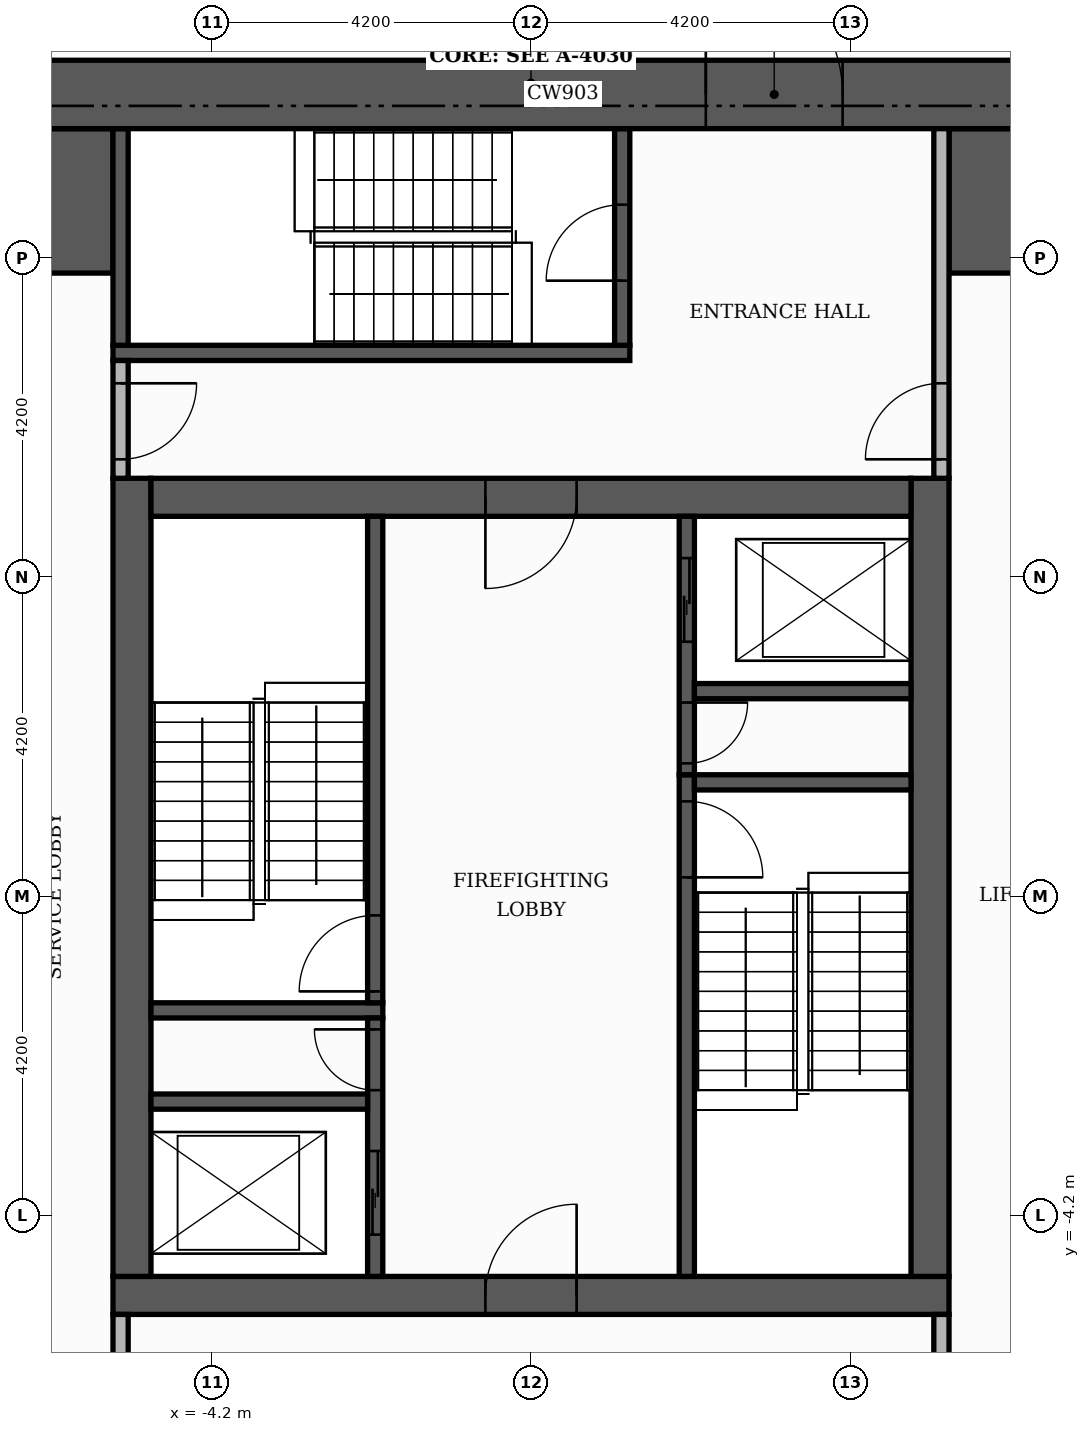
"""IFC4 building model, lengths in metres.
Left out: names, types, materials, properties, quantities, classifications, styles, units other than length and angle.
Written with IfcOpenShell. Run it as: python <this file> out.ifc"""

import sys

from ifc_helpers import new_model, si_unit, direction, frame, frame_2d, origin, place, context, subcontext, project, spatial, rectangle, extrude, element, fill, save


model = new_model("IFC4")
c1 = context("Model", 3, precision=1e-05, world=origin(), true_north=direction((0.0, 1.0)))
c2 = subcontext(c1, "Body", "Model", "MODEL_VIEW")
j1 = project(units=[si_unit("LENGTHUNIT", "METRE"), si_unit("PLANEANGLEUNIT", "RADIAN")], contexts=[c1])
p1 = place(None, origin())
s1 = spatial("IfcSite", under=j1, at=p1, CompositionType="ELEMENT")
p2 = place(p1, origin())
s2 = spatial("IfcBuilding", under=s1, at=p2, CompositionType="ELEMENT")
p3 = place(p2, frame((0.0, 0.0, 180.6)))
s3 = spatial("IfcBuildingStorey", under=s2, at=p3, CompositionType="ELEMENT", Elevation=180.6)
p4 = place(p3, frame((-5.5, -5.25, 0.0), z_axis=(0.0, 0.0, 1.0), x_axis=(1.0, 0.0, 0.0)))
e1 = element("IfcWall", 1, at=p4, inside=s3, PredefinedType="SHEAR", context=c2, shape_type="SweptSolid", body=[
    extrude(rectangle(XDim=11.0, YDim=0.5, at=frame_2d((5.5, 0.0))), origin(), (0.0, 0.0, 1.0), 7.38),
])
p5 = place(p4, frame((4.9, 0.0, 0.0)))
e2 = element("IfcOpeningElement", 2, at=p5, cuts=e1, PredefinedType="OPENING", context=c2, shape_type="SweptSolid", body=[
    extrude(rectangle(XDim=1.2, YDim=2.1, at=frame_2d((0.6, 1.05))), frame((0.0, 0.26, 0.0), z_axis=(0.0, -1.0, 0.0), x_axis=(1.0, 0.0, 0.0)), (0.0, 0.0, 1.0), 0.52),
])
for number, where, z_axis, x_axis in (
    (3, (-5.25, -5.0, 0.0), (0.0, 0.0, 1.0), (0.0, 1.0, 0.0)),
    (4, (5.25, -5.0, 0.0), (0.0, 0.0, 1.0), (0.0, 1.0, 0.0)),
):
    element("IfcWall", number, at=place(p3, frame(where, z_axis=z_axis, x_axis=x_axis)), inside=s3, PredefinedType="SHEAR", context=c2, shape_type="SweptSolid", body=[
        extrude(rectangle(XDim=10.5, YDim=0.5, at=frame_2d((5.25, 0.0))), origin(), (0.0, 0.0, 1.0), 7.38),
    ])
p6 = place(p3, frame((-5.0, 5.25, 0.0), z_axis=(0.0, 0.0, 1.0), x_axis=(1.0, 0.0, 0.0)))
e5 = element("IfcWall", 5, at=p6, inside=s3, PredefinedType="SHEAR", context=c2, shape_type="SweptSolid", body=[
    extrude(rectangle(XDim=10.0, YDim=0.5, at=frame_2d((5.0, 0.0))), origin(), (0.0, 0.0, 1.0), 7.38),
])
p7 = place(p6, frame((4.4, 0.0, 0.0)))
e6 = element("IfcOpeningElement", 6, at=p7, cuts=e5, PredefinedType="OPENING", context=c2, shape_type="SweptSolid", body=[
    extrude(rectangle(XDim=1.2, YDim=2.1, at=frame_2d((0.6, 1.05))), frame((0.0, 0.26, 0.0), z_axis=(0.0, -1.0, 0.0), x_axis=(1.0, 0.0, 0.0)), (0.0, 0.0, 1.0), 0.52),
])
for number, where, z_axis, x_axis in (
    (7, (-10.1, 9.15, 0.0), (0.0, 0.0, 1.0), (1.0, 0.0, 0.0)),
    (8, (5.5, 9.15, 0.0), (0.0, 0.0, 1.0), (1.0, 0.0, 0.0)),
):
    element("IfcWall", number, at=place(p3, frame(where, z_axis=z_axis, x_axis=x_axis)), inside=s3, PredefinedType="SHEAR", context=c2, shape_type="SweptSolid", body=[
        extrude(rectangle(XDim=4.6, YDim=1.9, at=frame_2d((2.3, 0.0))), origin(), (0.0, 0.0, 1.0), 7.38),
    ])
p8 = place(p3, frame((2.05, -5.0, 0.0), z_axis=(0.0, 0.0, 1.0), x_axis=(0.0, 1.0, 0.0)))
e9 = element("IfcWall", 9, at=p8, inside=s3, PredefinedType="SHEAR", context=c2, shape_type="SweptSolid", body=[
    extrude(rectangle(XDim=6.6, YDim=0.2, at=frame_2d((3.3, 0.0))), origin(), (0.0, 0.0, 1.0), 7.38),
])
p9 = place(p8, frame((5.25, 0.0, 0.0)))
e10 = element("IfcOpeningElement", 10, at=p9, cuts=e9, PredefinedType="OPENING", context=c2, shape_type="SweptSolid", body=[
    extrude(rectangle(XDim=1.0, YDim=2.1, at=frame_2d((0.5, 1.05))), frame((0.0, 0.11, 0.0), z_axis=(0.0, -1.0, 0.0), x_axis=(1.0, 0.0, 0.0)), (0.0, 0.0, 1.0), 0.22),
])
p10 = place(p3, frame((-5.0, -1.5, 0.0), z_axis=(0.0, 0.0, 1.0), x_axis=(1.0, 0.0, 0.0)))
e11 = element("IfcWall", 11, at=p10, inside=s3, PredefinedType="SHEAR", context=c2, shape_type="SweptSolid", body=[
    extrude(rectangle(XDim=3.05, YDim=0.2, at=frame_2d((1.525, 0.0))), origin(), (0.0, 0.0, 1.0), 7.38),
])
p11 = place(p3, frame((-2.05, -1.4, 0.0), z_axis=(0.0, 0.0, 1.0), x_axis=(0.0, 1.0, 0.0)))
e12 = element("IfcWall", 12, at=p11, inside=s3, PredefinedType="SHEAR", context=c2, shape_type="SweptSolid", body=[
    extrude(rectangle(XDim=6.4, YDim=0.2, at=frame_2d((3.2, 0.0))), origin(), (0.0, 0.0, 1.0), 7.38),
])
p12 = place(p11, frame((0.15, 0.0, 0.0)))
e13 = element("IfcOpeningElement", 13, at=p12, cuts=e12, PredefinedType="OPENING", context=c2, shape_type="SweptSolid", body=[
    extrude(rectangle(XDim=1.0, YDim=2.1, at=frame_2d((0.5, 1.05))), frame((0.0, 0.11, 0.0), z_axis=(0.0, -1.0, 0.0), x_axis=(1.0, 0.0, 0.0)), (0.0, 0.0, 1.0), 0.22),
])
p13 = place(p3, frame((2.15, 1.5, 0.0), z_axis=(0.0, 0.0, 1.0), x_axis=(1.0, 0.0, 0.0)))
e14 = element("IfcWall", 14, at=p13, inside=s3, PredefinedType="SHEAR", context=c2, shape_type="SweptSolid", body=[
    extrude(rectangle(XDim=2.85, YDim=0.2, at=frame_2d((1.425, 0.0))), origin(), (0.0, 0.0, 1.0), 7.38),
])
p14 = place(p3, frame((-5.5, 7.15, 0.0), z_axis=(0.0, 0.0, 1.0), x_axis=(1.0, 0.0, 0.0)))
e15 = element("IfcWall", 15, at=p14, inside=s3, PredefinedType="SHEAR", context=c2, shape_type="SweptSolid", body=[
    extrude(rectangle(XDim=6.8, YDim=0.2, at=frame_2d((3.4, 0.0))), origin(), (0.0, 0.0, 1.0), 7.38),
])
p15 = place(p3, frame((-5.4, 7.25, 0.0), z_axis=(0.0, 0.0, 1.0), x_axis=(0.0, 1.0, 0.0)))
e16 = element("IfcWall", 16, at=p15, inside=s3, PredefinedType="SHEAR", context=c2, shape_type="SweptSolid", body=[
    extrude(rectangle(XDim=2.85, YDim=0.2, at=frame_2d((1.425, 0.0))), origin(), (0.0, 0.0, 1.0), 7.38),
])
p16 = place(p3, frame((1.2, 7.25, 0.0), z_axis=(0.0, 0.0, 1.0), x_axis=(0.0, 1.0, 0.0)))
e17 = element("IfcWall", 17, at=p16, inside=s3, PredefinedType="SHEAR", context=c2, shape_type="SweptSolid", body=[
    extrude(rectangle(XDim=2.85, YDim=0.2, at=frame_2d((1.425, 0.0))), origin(), (0.0, 0.0, 1.0), 7.38),
])
p17 = place(p16, frame((0.85, 0.0, 0.0)))
e18 = element("IfcOpeningElement", 18, at=p17, cuts=e17, PredefinedType="OPENING", context=c2, shape_type="SweptSolid", body=[
    extrude(rectangle(XDim=1.0, YDim=2.1, at=frame_2d((0.5, 1.05))), frame((0.0, 0.11, 0.0), z_axis=(0.0, -1.0, 0.0), x_axis=(1.0, 0.0, 0.0)), (0.0, 0.0, 1.0), 0.22),
])
p18 = place(p3, frame((-2.05, -5.0, 0.0), z_axis=(0.0, 0.0, 1.0), x_axis=(0.0, 1.0, 0.0)))
e19 = element("IfcWall", 19, at=p18, inside=s3, PredefinedType="SHEAR", context=c2, shape_type="SweptSolid", body=[
    extrude(rectangle(XDim=3.4, YDim=0.2, at=frame_2d((1.7, 0.0))), origin(), (0.0, 0.0, 1.0), 7.38),
])
p19 = place(p18, frame((0.55, 0.0, 0.0)))
e20 = element("IfcOpeningElement", 20, at=p19, cuts=e19, PredefinedType="OPENING", context=c2, shape_type="SweptSolid", body=[
    extrude(rectangle(XDim=1.1, YDim=2.1, at=frame_2d((0.55, 1.05))), frame((0.0, 0.11, 0.0), z_axis=(0.0, -1.0, 0.0), x_axis=(1.0, 0.0, 0.0)), (0.0, 0.0, 1.0), 0.22),
])
p20 = place(p18, frame((2.45, 0.0, 0.0)))
e21 = element("IfcOpeningElement", 21, at=p20, cuts=e19, PredefinedType="OPENING", context=c2, shape_type="SweptSolid", body=[
    extrude(rectangle(XDim=0.8, YDim=2.1, at=frame_2d((0.4, 1.05))), frame((0.0, 0.11, 0.0), z_axis=(0.0, -1.0, 0.0), x_axis=(1.0, 0.0, 0.0)), (0.0, 0.0, 1.0), 0.22),
])
p21 = place(p3, frame((-5.0, -2.7, 0.0), z_axis=(0.0, 0.0, 1.0), x_axis=(1.0, 0.0, 0.0)))
e22 = element("IfcWall", 22, at=p21, inside=s3, PredefinedType="SHEAR", context=c2, shape_type="SweptSolid", body=[
    extrude(rectangle(XDim=2.85, YDim=0.2, at=frame_2d((1.425, 0.0))), origin(), (0.0, 0.0, 1.0), 7.38),
])
p22 = place(p3, frame((2.05, 1.6, 0.0), z_axis=(0.0, 0.0, 1.0), x_axis=(0.0, 1.0, 0.0)))
e23 = element("IfcWall", 23, at=p22, inside=s3, PredefinedType="SHEAR", context=c2, shape_type="SweptSolid", body=[
    extrude(rectangle(XDim=3.4, YDim=0.2, at=frame_2d((1.7, 0.0))), origin(), (0.0, 0.0, 1.0), 7.38),
])
p23 = place(p22, frame((1.75, 0.0, 0.0)))
e24 = element("IfcOpeningElement", 24, at=p23, cuts=e23, PredefinedType="OPENING", context=c2, shape_type="SweptSolid", body=[
    extrude(rectangle(XDim=1.1, YDim=2.1, at=frame_2d((0.55, 1.05))), frame((0.0, 0.11, 0.0), z_axis=(0.0, -1.0, 0.0), x_axis=(1.0, 0.0, 0.0)), (0.0, 0.0, 1.0), 0.22),
])
p24 = place(p22, frame((0.15, 0.0, 0.0)))
e25 = element("IfcOpeningElement", 25, at=p24, cuts=e23, PredefinedType="OPENING", context=c2, shape_type="SweptSolid", body=[
    extrude(rectangle(XDim=0.8, YDim=2.1, at=frame_2d((0.4, 1.05))), frame((0.0, 0.11, 0.0), z_axis=(0.0, -1.0, 0.0), x_axis=(1.0, 0.0, 0.0)), (0.0, 0.0, 1.0), 0.22),
])
p25 = place(p3, frame((2.15, 2.7, 0.0), z_axis=(0.0, 0.0, 1.0), x_axis=(1.0, 0.0, 0.0)))
e26 = element("IfcWall", 26, at=p25, inside=s3, PredefinedType="SHEAR", context=c2, shape_type="SweptSolid", body=[
    extrude(rectangle(XDim=2.85, YDim=0.2, at=frame_2d((1.425, 0.0))), origin(), (0.0, 0.0, 1.0), 7.38),
])
p26 = place(p3, frame((-11.0, 10.55, 0.0), z_axis=(0.0, 0.0, 1.0), x_axis=(1.0, 0.0, 0.0)))
e27 = element("IfcWall", 27, at=p26, inside=s3, PredefinedType="SHEAR", context=c2, shape_type="SweptSolid", body=[
    extrude(rectangle(XDim=22.0, YDim=0.9, at=frame_2d((11.0, 0.0))), origin(), (0.0, 0.0, 1.0), 7.38),
])
p27 = place(p26, frame((13.3, 0.0, 0.0)))
e28 = element("IfcOpeningElement", 28, at=p27, cuts=e27, PredefinedType="OPENING", context=c2, shape_type="SweptSolid", body=[
    extrude(rectangle(XDim=1.8, YDim=2.2, at=frame_2d((0.9, 1.1))), frame((0.0, 0.46, 0.0), z_axis=(0.0, -1.0, 0.0), x_axis=(1.0, 0.0, 0.0)), (0.0, 0.0, 1.0), 0.92),
])
p28 = place(p3, frame((-5.4, -10.1, 0.0), z_axis=(0.0, 0.0, 1.0), x_axis=(0.0, 1.0, 0.0)))
e29 = element("IfcWall", 29, at=p28, inside=s3, PredefinedType="PARTITIONING", context=c2, shape_type="SweptSolid", body=[
    extrude(rectangle(XDim=4.6, YDim=0.2, at=frame_2d((2.3, 0.0))), origin(), (0.0, 0.0, 1.0), 7.38),
])
p29 = place(p28, frame((2.9, 0.0, 0.0)))
e30 = element("IfcOpeningElement", 30, at=p29, cuts=e29, PredefinedType="OPENING", context=c2, shape_type="SweptSolid", body=[
    extrude(rectangle(XDim=1.0, YDim=2.1, at=frame_2d((0.5, 1.05))), frame((0.0, 0.11, 0.0), z_axis=(0.0, -1.0, 0.0), x_axis=(1.0, 0.0, 0.0)), (0.0, 0.0, 1.0), 0.22),
])
p30 = place(p3, frame((5.4, -10.1, 0.0), z_axis=(0.0, 0.0, 1.0), x_axis=(0.0, 1.0, 0.0)))
e31 = element("IfcWall", 31, at=p30, inside=s3, PredefinedType="PARTITIONING", context=c2, shape_type="SweptSolid", body=[
    extrude(rectangle(XDim=4.6, YDim=0.2, at=frame_2d((2.3, 0.0))), origin(), (0.0, 0.0, 1.0), 7.38),
])
p31 = place(p30, frame((2.9, 0.0, 0.0)))
e32 = element("IfcOpeningElement", 32, at=p31, cuts=e31, PredefinedType="OPENING", context=c2, shape_type="SweptSolid", body=[
    extrude(rectangle(XDim=1.0, YDim=2.1, at=frame_2d((0.5, 1.05))), frame((0.0, 0.11, 0.0), z_axis=(0.0, -1.0, 0.0), x_axis=(1.0, 0.0, 0.0)), (0.0, 0.0, 1.0), 0.22),
])
p32 = place(p3, frame((-5.4, 5.5, 0.0), z_axis=(0.0, 0.0, 1.0), x_axis=(0.0, 1.0, 0.0)))
e33 = element("IfcWall", 33, at=p32, inside=s3, PredefinedType="PARTITIONING", context=c2, shape_type="SweptSolid", body=[
    extrude(rectangle(XDim=1.55, YDim=0.2, at=frame_2d((0.775, 0.0))), origin(), (0.0, 0.0, 1.0), 7.38),
])
p33 = place(p32, frame((0.25, 0.0, 0.0)))
e34 = element("IfcOpeningElement", 34, at=p33, cuts=e33, PredefinedType="OPENING", context=c2, shape_type="SweptSolid", body=[
    extrude(rectangle(XDim=1.0, YDim=2.1, at=frame_2d((0.5, 1.05))), frame((0.0, 0.11, 0.0), z_axis=(0.0, -1.0, 0.0), x_axis=(1.0, 0.0, 0.0)), (0.0, 0.0, 1.0), 0.22),
])
p34 = place(p3, frame((5.4, 5.5, 0.0), z_axis=(0.0, 0.0, 1.0), x_axis=(0.0, 1.0, 0.0)))
e35 = element("IfcWall", 35, at=p34, inside=s3, PredefinedType="PARTITIONING", context=c2, shape_type="SweptSolid", body=[
    extrude(rectangle(XDim=4.6, YDim=0.2, at=frame_2d((2.3, 0.0))), origin(), (0.0, 0.0, 1.0), 7.38),
])
p35 = place(p34, frame((0.25, 0.0, 0.0)))
e36 = element("IfcOpeningElement", 36, at=p35, cuts=e35, PredefinedType="OPENING", context=c2, shape_type="SweptSolid", body=[
    extrude(rectangle(XDim=1.0, YDim=2.1, at=frame_2d((0.5, 1.05))), frame((0.0, 0.11, 0.0), z_axis=(0.0, -1.0, 0.0), x_axis=(1.0, 0.0, 0.0)), (0.0, 0.0, 1.0), 0.22),
])
p36 = place(p23, origin())
e37 = element("IfcDoor", 37, at=p36, inside=s3, OperationType="SLIDING_TO_LEFT", PredefinedType="DOOR", context=c2, shape_type="SweptSolid", body=[
    extrude(rectangle(XDim=1.1, YDim=2.1, at=frame_2d((0.55, 1.05))), frame((0.0, 0.025, 0.0), z_axis=(0.0, -1.0, 0.0), x_axis=(1.0, 0.0, 0.0)), (0.0, 0.0, 1.0), 0.05),
])
fill(e24, e37)
p37 = place(p19, origin())
e38 = element("IfcDoor", 38, at=p37, inside=s3, OperationType="SLIDING_TO_LEFT", PredefinedType="DOOR", context=c2, shape_type="SweptSolid", body=[
    extrude(rectangle(XDim=1.1, YDim=2.1, at=frame_2d((0.55, 1.05))), frame((0.0, 0.025, 0.0), z_axis=(0.0, -1.0, 0.0), x_axis=(1.0, 0.0, 0.0)), (0.0, 0.0, 1.0), 0.05),
])
fill(e20, e38)
p38 = place(p12, origin())
e39 = element("IfcDoor", 39, at=p38, inside=s3, OperationType="SINGLE_SWING_LEFT", PredefinedType="DOOR", context=c2, shape_type="SweptSolid", body=[
    extrude(rectangle(XDim=1.0, YDim=2.1, at=frame_2d((0.5, 1.05))), frame((0.0, 0.025, 0.0), z_axis=(0.0, -1.0, 0.0), x_axis=(1.0, 0.0, 0.0)), (0.0, 0.0, 1.0), 0.05),
])
fill(e13, e39)
p39 = place(p9, frame((1.0, 0.0, 0.0), z_axis=(0.0, 0.0, 1.0), x_axis=(-1.0, 0.0, 0.0)))
e40 = element("IfcDoor", 40, at=p39, inside=s3, OperationType="SINGLE_SWING_LEFT", PredefinedType="DOOR", context=c2, shape_type="SweptSolid", body=[
    extrude(rectangle(XDim=1.0, YDim=2.1, at=frame_2d((0.5, 1.05))), frame((0.0, 0.025, 0.0), z_axis=(0.0, -1.0, 0.0), x_axis=(1.0, 0.0, 0.0)), (0.0, 0.0, 1.0), 0.05),
])
fill(e10, e40)
p40 = place(p24, frame((0.8, 0.0, 0.0), z_axis=(0.0, 0.0, 1.0), x_axis=(-1.0, 0.0, 0.0)))
e41 = element("IfcDoor", 41, at=p40, inside=s3, OperationType="SINGLE_SWING_RIGHT", PredefinedType="DOOR", context=c2, shape_type="SweptSolid", body=[
    extrude(rectangle(XDim=0.8, YDim=2.1, at=frame_2d((0.4, 1.05))), frame((0.0, 0.025, 0.0), z_axis=(0.0, -1.0, 0.0), x_axis=(1.0, 0.0, 0.0)), (0.0, 0.0, 1.0), 0.05),
])
fill(e25, e41)
p41 = place(p20, origin())
e42 = element("IfcDoor", 42, at=p41, inside=s3, OperationType="SINGLE_SWING_RIGHT", PredefinedType="DOOR", context=c2, shape_type="SweptSolid", body=[
    extrude(rectangle(XDim=0.8, YDim=2.1, at=frame_2d((0.4, 1.05))), frame((0.0, 0.025, 0.0), z_axis=(0.0, -1.0, 0.0), x_axis=(1.0, 0.0, 0.0)), (0.0, 0.0, 1.0), 0.05),
])
fill(e21, e42)
p42 = place(p7, frame((1.2, 0.0, 0.0), z_axis=(0.0, 0.0, 1.0), x_axis=(-1.0, 0.0, 0.0)))
e43 = element("IfcDoor", 43, at=p42, inside=s3, OperationType="SINGLE_SWING_LEFT", PredefinedType="DOOR", context=c2, shape_type="SweptSolid", body=[
    extrude(rectangle(XDim=1.2, YDim=2.1, at=frame_2d((0.6, 1.05))), frame((0.0, 0.025, 0.0), z_axis=(0.0, -1.0, 0.0), x_axis=(1.0, 0.0, 0.0)), (0.0, 0.0, 1.0), 0.05),
])
fill(e6, e43)
p43 = place(p5, origin())
e44 = element("IfcDoor", 44, at=p43, inside=s3, OperationType="SINGLE_SWING_RIGHT", PredefinedType="DOOR", context=c2, shape_type="SweptSolid", body=[
    extrude(rectangle(XDim=1.2, YDim=2.1, at=frame_2d((0.6, 1.05))), frame((0.0, 0.025, 0.0), z_axis=(0.0, -1.0, 0.0), x_axis=(1.0, 0.0, 0.0)), (0.0, 0.0, 1.0), 0.05),
])
fill(e2, e44)
p44 = place(p17, origin())
e45 = element("IfcDoor", 45, at=p44, inside=s3, OperationType="SINGLE_SWING_LEFT", PredefinedType="DOOR", context=c2, shape_type="SweptSolid", body=[
    extrude(rectangle(XDim=1.0, YDim=2.1, at=frame_2d((0.5, 1.05))), frame((0.0, 0.025, 0.0), z_axis=(0.0, -1.0, 0.0), x_axis=(1.0, 0.0, 0.0)), (0.0, 0.0, 1.0), 0.05),
])
fill(e18, e45)
p45 = place(p33, frame((1.0, 0.0, 0.0), z_axis=(0.0, 0.0, 1.0), x_axis=(-1.0, 0.0, 0.0)))
e46 = element("IfcDoor", 46, at=p45, inside=s3, OperationType="SINGLE_SWING_RIGHT", PredefinedType="DOOR", context=c2, shape_type="SweptSolid", body=[
    extrude(rectangle(XDim=1.0, YDim=2.1, at=frame_2d((0.5, 1.05))), frame((0.0, 0.025, 0.0), z_axis=(0.0, -1.0, 0.0), x_axis=(1.0, 0.0, 0.0)), (0.0, 0.0, 1.0), 0.05),
])
fill(e34, e46)
p46 = place(p35, origin())
e47 = element("IfcDoor", 47, at=p46, inside=s3, OperationType="SINGLE_SWING_LEFT", PredefinedType="DOOR", context=c2, shape_type="SweptSolid", body=[
    extrude(rectangle(XDim=1.0, YDim=2.1, at=frame_2d((0.5, 1.05))), frame((0.0, 0.025, 0.0), z_axis=(0.0, -1.0, 0.0), x_axis=(1.0, 0.0, 0.0)), (0.0, 0.0, 1.0), 0.05),
])
fill(e36, e47)
p47 = place(p27, origin())
e48 = element("IfcDoor", 48, at=p47, inside=s3, OperationType="DOUBLE_DOOR_SINGLE_SWING", PredefinedType="DOOR", context=c2, shape_type="SweptSolid", body=[
    extrude(rectangle(XDim=1.8, YDim=2.2, at=frame_2d((0.9, 1.1))), frame((0.0, 0.025, 0.0), z_axis=(0.0, -1.0, 0.0), x_axis=(1.0, 0.0, 0.0)), (0.0, 0.0, 1.0), 0.05),
])
fill(e28, e48)
save(model, sys.argv[1])
